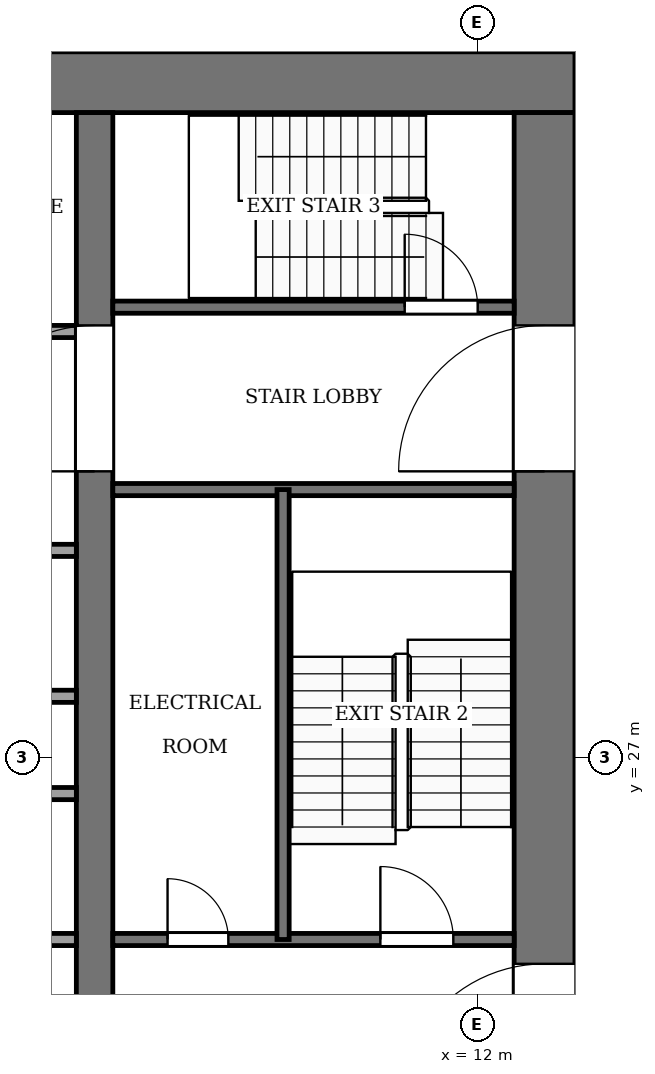
"""IFC4 building model, lengths in metres.
Left out: names, types, materials, properties, quantities, classifications, styles, units other than length and angle.
Written with IfcOpenShell. Run it as: python <this file> out.ifc"""

import sys

from ifc_helpers import new_model, si_unit, direction, frame, frame_2d, origin, place, context, subcontext, project, spatial, rectangle, extrude, element, fill, save


model = new_model("IFC4")
c1 = context("Model", 3, precision=1e-05, world=origin(), true_north=direction((0.0, 1.0)))
c2 = subcontext(c1, "Body", "Model", "MODEL_VIEW")
j1 = project(units=[si_unit("LENGTHUNIT", "METRE"), si_unit("PLANEANGLEUNIT", "RADIAN")], contexts=[c1])
p1 = place(None, origin())
s1 = spatial("IfcSite", under=j1, at=p1, CompositionType="ELEMENT")
p2 = place(p1, origin())
s2 = spatial("IfcBuilding", under=s1, at=p2, CompositionType="ELEMENT")
p3 = place(p2, frame((0.0, 0.0, 158.0)))
s3 = spatial("IfcBuildingStorey", under=s2, at=p3, CompositionType="ELEMENT", Elevation=158.0)
p4 = place(p3, frame((-13.6, 38.1, -0.13), z_axis=(0.0, 0.0, 1.0), x_axis=(1.0, 0.0, 0.0)))
e1 = element("IfcWall", 1, at=p4, inside=s3, PredefinedType="SHEAR", context=c2, shape_type="SweptSolid", body=[
    extrude(rectangle(XDim=27.2, YDim=1.0, at=frame_2d((13.6, 0.0))), origin(), (0.0, 0.0, 1.0), 4.0),
])
p5 = place(p3, frame((13.1, 18.4, -0.13), z_axis=(0.0, 0.0, 1.0), x_axis=(0.0, 1.0, 0.0)))
e2 = element("IfcWall", 2, at=p5, inside=s3, PredefinedType="SHEAR", context=c2, shape_type="SweptSolid", body=[
    extrude(rectangle(XDim=19.2, YDim=1.0, at=frame_2d((9.6, 0.0))), origin(), (0.0, 0.0, 1.0), 4.0),
])
p6 = place(p5, frame((2.8, 0.0, 0.13)))
e3 = element("IfcOpeningElement", 3, at=p6, cuts=e2, PredefinedType="OPENING", context=c2, shape_type="SweptSolid", body=[
    extrude(rectangle(XDim=2.4, YDim=2.4, at=frame_2d((1.2, 1.2))), frame((0.0, 0.51, 0.0), z_axis=(0.0, -1.0, 0.0), x_axis=(1.0, 0.0, 0.0)), (0.0, 0.0, 1.0), 1.02),
])
p7 = place(p5, frame((13.3, 0.0, 0.13)))
e4 = element("IfcOpeningElement", 4, at=p7, cuts=e2, PredefinedType="OPENING", context=c2, shape_type="SweptSolid", body=[
    extrude(rectangle(XDim=2.4, YDim=2.4, at=frame_2d((1.2, 1.2))), frame((0.0, 0.51, 0.0), z_axis=(0.0, -1.0, 0.0), x_axis=(1.0, 0.0, 0.0)), (0.0, 0.0, 1.0), 1.02),
])
p8 = place(p3, frame((5.7, 18.4, -0.13), z_axis=(0.0, 0.0, 1.0), x_axis=(0.0, 1.0, 0.0)))
e5 = element("IfcWall", 5, at=p8, inside=s3, PredefinedType="SHEAR", context=c2, shape_type="SweptSolid", body=[
    extrude(rectangle(XDim=19.2, YDim=0.6, at=frame_2d((9.6, 0.0))), origin(), (0.0, 0.0, 1.0), 4.0),
])
p9 = place(p8, frame((13.3, 0.0, 0.13)))
e6 = element("IfcOpeningElement", 6, at=p9, cuts=e5, PredefinedType="OPENING", context=c2, shape_type="SweptSolid", body=[
    extrude(rectangle(XDim=2.4, YDim=2.4, at=frame_2d((1.2, 1.2))), frame((0.0, 0.31, 0.0), z_axis=(0.0, -1.0, 0.0), x_axis=(1.0, 0.0, 0.0)), (0.0, 0.0, 1.0), 0.62),
])
p10 = place(p3, frame((-5.4, 24.0, 0.0), z_axis=(0.0, 0.0, 1.0), x_axis=(1.0, 0.0, 0.0)))
e7 = element("IfcWall", 7, at=p10, inside=s3, PredefinedType="PARTITIONING", context=c2, shape_type="SweptSolid", body=[
    extrude(rectangle(XDim=10.8, YDim=0.2, at=frame_2d((5.4, 0.0))), origin(), (0.0, 0.0, 1.0), 3.87),
])
p11 = place(p10, frame((0.75, 0.0, 0.0)))
e8 = element("IfcOpeningElement", 8, at=p11, cuts=e7, PredefinedType="OPENING", context=c2, shape_type="SweptSolid", body=[
    extrude(rectangle(XDim=1.2, YDim=2.2, at=frame_2d((0.6, 1.1))), frame((0.0, 0.11, 0.0), z_axis=(0.0, -1.0, 0.0), x_axis=(1.0, 0.0, 0.0)), (0.0, 0.0, 1.0), 0.22),
])
p12 = place(p10, frame((3.45, 0.0, 0.0)))
e9 = element("IfcOpeningElement", 9, at=p12, cuts=e7, PredefinedType="OPENING", context=c2, shape_type="SweptSolid", body=[
    extrude(rectangle(XDim=1.2, YDim=2.2, at=frame_2d((0.6, 1.1))), frame((0.0, 0.11, 0.0), z_axis=(0.0, -1.0, 0.0), x_axis=(1.0, 0.0, 0.0)), (0.0, 0.0, 1.0), 0.22),
])
p13 = place(p10, frame((6.15, 0.0, 0.0)))
e10 = element("IfcOpeningElement", 10, at=p13, cuts=e7, PredefinedType="OPENING", context=c2, shape_type="SweptSolid", body=[
    extrude(rectangle(XDim=1.2, YDim=2.2, at=frame_2d((0.6, 1.1))), frame((0.0, 0.11, 0.0), z_axis=(0.0, -1.0, 0.0), x_axis=(1.0, 0.0, 0.0)), (0.0, 0.0, 1.0), 0.22),
])
p14 = place(p10, frame((8.85, 0.0, 0.0)))
e11 = element("IfcOpeningElement", 11, at=p14, cuts=e7, PredefinedType="OPENING", context=c2, shape_type="SweptSolid", body=[
    extrude(rectangle(XDim=1.2, YDim=2.2, at=frame_2d((0.6, 1.1))), frame((0.0, 0.11, 0.0), z_axis=(0.0, -1.0, 0.0), x_axis=(1.0, 0.0, 0.0)), (0.0, 0.0, 1.0), 0.22),
])
p15 = place(p3, frame((6.0, 24.0, 0.0), z_axis=(0.0, 0.0, 1.0), x_axis=(1.0, 0.0, 0.0)))
e12 = element("IfcWall", 12, at=p15, inside=s3, PredefinedType="PARTITIONING", context=c2, shape_type="SweptSolid", body=[
    extrude(rectangle(XDim=6.6, YDim=0.2, at=frame_2d((3.3, 0.0))), origin(), (0.0, 0.0, 1.0), 3.87),
])
p16 = place(p15, frame((0.9, 0.0, 0.0)))
e13 = element("IfcOpeningElement", 13, at=p16, cuts=e12, PredefinedType="OPENING", context=c2, shape_type="SweptSolid", body=[
    extrude(rectangle(XDim=1.0, YDim=2.1, at=frame_2d((0.5, 1.05))), frame((0.0, 0.11, 0.0), z_axis=(0.0, -1.0, 0.0), x_axis=(1.0, 0.0, 0.0)), (0.0, 0.0, 1.0), 0.22),
])
p17 = place(p15, frame((4.4, 0.0, 0.0)))
e14 = element("IfcOpeningElement", 14, at=p17, cuts=e12, PredefinedType="OPENING", context=c2, shape_type="SweptSolid", body=[
    extrude(rectangle(XDim=1.2, YDim=2.2, at=frame_2d((0.6, 1.1))), frame((0.0, 0.11, 0.0), z_axis=(0.0, -1.0, 0.0), x_axis=(1.0, 0.0, 0.0)), (0.0, 0.0, 1.0), 0.22),
])
for number, where, z_axis, x_axis in (
    (15, (-5.4, 26.4, 0.0), (0.0, 0.0, 1.0), (1.0, 0.0, 0.0)),
    (16, (-5.4, 28.0, 0.0), (0.0, 0.0, 1.0), (1.0, 0.0, 0.0)),
    (17, (-5.4, 30.4, 0.0), (0.0, 0.0, 1.0), (1.0, 0.0, 0.0)),
):
    element("IfcWall", number, at=place(p3, frame(where, z_axis=z_axis, x_axis=x_axis)), inside=s3, PredefinedType="PARTITIONING", context=c2, shape_type="SweptSolid", body=[
        extrude(rectangle(XDim=10.8, YDim=0.2, at=frame_2d((5.4, 0.0))), origin(), (0.0, 0.0, 1.0), 3.87),
    ])
p18 = place(p3, frame((6.0, 31.4, 0.0), z_axis=(0.0, 0.0, 1.0), x_axis=(1.0, 0.0, 0.0)))
e18 = element("IfcWall", 18, at=p18, inside=s3, PredefinedType="PARTITIONING", context=c2, shape_type="SweptSolid", body=[
    extrude(rectangle(XDim=6.6, YDim=0.2, at=frame_2d((3.3, 0.0))), origin(), (0.0, 0.0, 1.0), 3.87),
])
p19 = place(p3, frame((-5.4, 34.0, 0.0), z_axis=(0.0, 0.0, 1.0), x_axis=(1.0, 0.0, 0.0)))
e19 = element("IfcWall", 19, at=p19, inside=s3, PredefinedType="PARTITIONING", context=c2, shape_type="SweptSolid", body=[
    extrude(rectangle(XDim=10.8, YDim=0.2, at=frame_2d((5.4, 0.0))), origin(), (0.0, 0.0, 1.0), 3.87),
])
p20 = place(p19, frame((6.15, 0.0, 0.0)))
e20 = element("IfcOpeningElement", 20, at=p20, cuts=e19, PredefinedType="OPENING", context=c2, shape_type="SweptSolid", body=[
    extrude(rectangle(XDim=1.2, YDim=2.2, at=frame_2d((0.6, 1.1))), frame((0.0, 0.11, 0.0), z_axis=(0.0, -1.0, 0.0), x_axis=(1.0, 0.0, 0.0)), (0.0, 0.0, 1.0), 0.22),
])
p21 = place(p19, frame((8.95, 0.0, 0.0)))
e21 = element("IfcOpeningElement", 21, at=p21, cuts=e19, PredefinedType="OPENING", context=c2, shape_type="SweptSolid", body=[
    extrude(rectangle(XDim=1.0, YDim=2.1, at=frame_2d((0.5, 1.05))), frame((0.0, 0.11, 0.0), z_axis=(0.0, -1.0, 0.0), x_axis=(1.0, 0.0, 0.0)), (0.0, 0.0, 1.0), 0.22),
])
p22 = place(p3, frame((6.0, 34.4, 0.0), z_axis=(0.0, 0.0, 1.0), x_axis=(1.0, 0.0, 0.0)))
e22 = element("IfcWall", 22, at=p22, inside=s3, PredefinedType="PARTITIONING", context=c2, shape_type="SweptSolid", body=[
    extrude(rectangle(XDim=6.6, YDim=0.2, at=frame_2d((3.3, 0.0))), origin(), (0.0, 0.0, 1.0), 3.87),
])
p23 = place(p22, frame((4.8, 0.0, 0.0)))
e23 = element("IfcOpeningElement", 23, at=p23, cuts=e22, PredefinedType="OPENING", context=c2, shape_type="SweptSolid", body=[
    extrude(rectangle(XDim=1.2, YDim=2.2, at=frame_2d((0.6, 1.1))), frame((0.0, 0.11, 0.0), z_axis=(0.0, -1.0, 0.0), x_axis=(1.0, 0.0, 0.0)), (0.0, 0.0, 1.0), 0.22),
])
p24 = place(p3, frame((8.8, 24.0, 0.0), z_axis=(0.0, 0.0, 1.0), x_axis=(0.0, 1.0, 0.0)))
e24 = element("IfcWall", 24, at=p24, inside=s3, PredefinedType="PARTITIONING", context=c2, shape_type="SweptSolid", body=[
    extrude(rectangle(XDim=7.4, YDim=0.2, at=frame_2d((3.7, 0.0))), origin(), (0.0, 0.0, 1.0), 3.87),
])
p25 = place(p16, origin())
e25 = element("IfcDoor", 25, at=p25, inside=s3, OperationType="SINGLE_SWING_LEFT", PredefinedType="DOOR", context=c2, shape_type="SweptSolid", body=[
    extrude(rectangle(XDim=1.0, YDim=2.1, at=frame_2d((0.5, 1.05))), frame((0.0, 0.025, 0.0), z_axis=(0.0, -1.0, 0.0), x_axis=(1.0, 0.0, 0.0)), (0.0, 0.0, 1.0), 0.05),
])
fill(e13, e25)
p26 = place(p17, origin())
e26 = element("IfcDoor", 26, at=p26, inside=s3, OperationType="SINGLE_SWING_LEFT", PredefinedType="DOOR", context=c2, shape_type="SweptSolid", body=[
    extrude(rectangle(XDim=1.2, YDim=2.2, at=frame_2d((0.6, 1.1))), frame((0.0, 0.025, 0.0), z_axis=(0.0, -1.0, 0.0), x_axis=(1.0, 0.0, 0.0)), (0.0, 0.0, 1.0), 0.05),
])
fill(e14, e26)
p27 = place(p23, origin())
e27 = element("IfcDoor", 27, at=p27, inside=s3, OperationType="SINGLE_SWING_RIGHT", PredefinedType="DOOR", context=c2, shape_type="SweptSolid", body=[
    extrude(rectangle(XDim=1.2, YDim=2.2, at=frame_2d((0.6, 1.1))), frame((0.0, 0.025, 0.0), z_axis=(0.0, -1.0, 0.0), x_axis=(1.0, 0.0, 0.0)), (0.0, 0.0, 1.0), 0.05),
])
fill(e23, e27)
p28 = place(p9, origin())
e28 = element("IfcDoor", 28, at=p28, inside=s3, OperationType="DOUBLE_DOOR_SINGLE_SWING", PredefinedType="DOOR", context=c2, shape_type="SweptSolid", body=[
    extrude(rectangle(XDim=2.4, YDim=2.4, at=frame_2d((1.2, 1.2))), frame((0.0, 0.025, 0.0), z_axis=(0.0, -1.0, 0.0), x_axis=(1.0, 0.0, 0.0)), (0.0, 0.0, 1.0), 0.05),
])
fill(e6, e28)
p29 = place(p6, origin())
e29 = element("IfcDoor", 29, at=p29, inside=s3, OperationType="DOUBLE_DOOR_SINGLE_SWING", PredefinedType="DOOR", context=c2, shape_type="SweptSolid", body=[
    extrude(rectangle(XDim=2.4, YDim=2.4, at=frame_2d((1.2, 1.2))), frame((0.0, 0.025, 0.0), z_axis=(0.0, -1.0, 0.0), x_axis=(1.0, 0.0, 0.0)), (0.0, 0.0, 1.0), 0.05),
])
fill(e3, e29)
p30 = place(p7, origin())
e30 = element("IfcDoor", 30, at=p30, inside=s3, OperationType="DOUBLE_DOOR_SINGLE_SWING", PredefinedType="DOOR", context=c2, shape_type="SweptSolid", body=[
    extrude(rectangle(XDim=2.4, YDim=2.4, at=frame_2d((1.2, 1.2))), frame((0.0, 0.025, 0.0), z_axis=(0.0, -1.0, 0.0), x_axis=(1.0, 0.0, 0.0)), (0.0, 0.0, 1.0), 0.05),
])
fill(e4, e30)
save(model, sys.argv[1])
